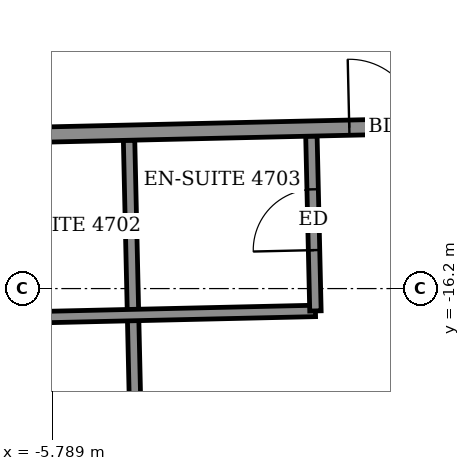
"""IFC4 building model, lengths in metres.
Left out: names, types, materials, properties, quantities, classifications, styles, units other than length and angle.
Written with IfcOpenShell. Run it as: python <this file> out.ifc"""

import sys

from ifc_helpers import new_model, si_unit, direction, frame, frame_2d, origin, place, context, subcontext, project, spatial, rectangle, extrude, element, fill, save


model = new_model("IFC4")
c1 = context("Model", 3, precision=1e-05, world=origin(), true_north=direction((0.0, 1.0)))
c2 = subcontext(c1, "Body", "Model", "MODEL_VIEW")
j1 = project(units=[si_unit("LENGTHUNIT", "METRE"), si_unit("PLANEANGLEUNIT", "RADIAN")], contexts=[c1])
p1 = place(None, origin())
s1 = spatial("IfcSite", under=j1, at=p1, CompositionType="ELEMENT")
p2 = place(p1, origin())
s2 = spatial("IfcBuilding", under=s1, at=p2, CompositionType="ELEMENT")
p3 = place(p2, frame((0.0, 0.0, 186.1)))
s3 = spatial("IfcBuildingStorey", under=s2, at=p3, CompositionType="ELEMENT", Elevation=186.1)
p4 = place(p3, frame((-4.646, -20.197, 0.0), z_axis=(0.0, 0.0, 1.0), x_axis=(-0.022692509051, 0.999742491861, 0.0)))
e1 = element("IfcWall", 1, at=p4, inside=s3, PredefinedType="PARTITIONING", context=c2, shape_type="SweptSolid", body=[
    extrude(rectangle(XDim=5.949, YDim=0.15, at=frame_2d((2.975, 0.0))), origin(), (0.0, 0.0, 1.0), 3.05),
])
p5 = place(p3, frame((-7.128, -16.603, 0.0), z_axis=(0.0, 0.0, 1.0), x_axis=(0.999741520352, 0.022735269617, 0.0)))
e2 = element("IfcWall", 2, at=p5, inside=s3, PredefinedType="PARTITIONING", context=c2, shape_type="SweptSolid", body=[
    extrude(rectangle(XDim=4.8, YDim=0.15, at=frame_2d((2.4, 0.0))), origin(), (0.0, 0.0, 1.0), 3.05),
])
p6 = place(p3, frame((-2.329, -16.494, 0.0), z_axis=(0.0, 0.0, 1.0), x_axis=(-0.023029983665, 0.999734774754, 0.0)))
e3 = element("IfcWall", 3, at=p6, inside=s3, PredefinedType="PARTITIONING", context=c2, shape_type="SweptSolid", body=[
    extrude(rectangle(XDim=2.3, YDim=0.15, at=frame_2d((1.15, 0.0))), origin(), (0.0, 0.0, 1.0), 3.05),
])
p7 = place(p6, frame((0.8, 0.0, 0.0)))
e4 = element("IfcOpeningElement", 4, at=p7, cuts=e3, PredefinedType="OPENING", context=c2, shape_type="SweptSolid", body=[
    extrude(rectangle(XDim=0.8, YDim=2.1, at=frame_2d((0.4, 1.05))), frame((0.0, 0.085, 0.0), z_axis=(0.0, -1.0, 0.0), x_axis=(1.0, 0.0, 0.0)), (0.0, 0.0, 1.0), 0.17),
])
p8 = place(p3, frame((-21.279, -14.523, 0.0), z_axis=(0.0, 0.0, 1.0), x_axis=(0.999742878501, 0.022675468818, 0.0)))
e5 = element("IfcWall", 5, at=p8, inside=s3, PredefinedType="PARTITIONING", context=c2, shape_type="SweptSolid", body=[
    extrude(rectangle(XDim=46.48, YDim=0.2, at=frame_2d((23.24, 0.0))), origin(), (0.0, 0.0, 1.0), 3.05),
])
p9 = place(p8, frame((1.4, 0.0, 0.0)))
e6 = element("IfcOpeningElement", 6, at=p9, cuts=e5, PredefinedType="OPENING", context=c2, shape_type="SweptSolid", body=[
    extrude(rectangle(XDim=1.0, YDim=2.1, at=frame_2d((0.5, 1.05))), frame((0.0, 0.11, 0.0), z_axis=(0.0, -1.0, 0.0), x_axis=(1.0, 0.0, 0.0)), (0.0, 0.0, 1.0), 0.22),
])
p10 = place(p8, frame((5.95, 0.0, 0.0)))
e7 = element("IfcOpeningElement", 7, at=p10, cuts=e5, PredefinedType="OPENING", context=c2, shape_type="SweptSolid", body=[
    extrude(rectangle(XDim=0.9, YDim=2.1, at=frame_2d((0.45, 1.05))), frame((0.0, 0.11, 0.0), z_axis=(0.0, -1.0, 0.0), x_axis=(1.0, 0.0, 0.0)), (0.0, 0.0, 1.0), 0.22),
])
p11 = place(p8, frame((10.575, 0.0, 0.0)))
e8 = element("IfcOpeningElement", 8, at=p11, cuts=e5, PredefinedType="OPENING", context=c2, shape_type="SweptSolid", body=[
    extrude(rectangle(XDim=0.9, YDim=2.1, at=frame_2d((0.45, 1.05))), frame((0.0, 0.11, 0.0), z_axis=(0.0, -1.0, 0.0), x_axis=(1.0, 0.0, 0.0)), (0.0, 0.0, 1.0), 0.22),
])
p12 = place(p8, frame((12.625, 0.0, 0.0)))
e9 = element("IfcOpeningElement", 9, at=p12, cuts=e5, PredefinedType="OPENING", context=c2, shape_type="SweptSolid", body=[
    extrude(rectangle(XDim=0.9, YDim=2.1, at=frame_2d((0.45, 1.05))), frame((0.0, 0.11, 0.0), z_axis=(0.0, -1.0, 0.0), x_axis=(1.0, 0.0, 0.0)), (0.0, 0.0, 1.0), 0.22),
])
p13 = place(p8, frame((19.4, 0.0, 0.0)))
e10 = element("IfcOpeningElement", 10, at=p13, cuts=e5, PredefinedType="OPENING", context=c2, shape_type="SweptSolid", body=[
    extrude(rectangle(XDim=0.9, YDim=2.1, at=frame_2d((0.45, 1.05))), frame((0.0, 0.11, 0.0), z_axis=(0.0, -1.0, 0.0), x_axis=(1.0, 0.0, 0.0)), (0.0, 0.0, 1.0), 0.22),
])
p14 = place(p8, frame((21.375, 0.0, 0.0)))
e11 = element("IfcOpeningElement", 11, at=p14, cuts=e5, PredefinedType="OPENING", context=c2, shape_type="SweptSolid", body=[
    extrude(rectangle(XDim=0.9, YDim=2.1, at=frame_2d((0.45, 1.05))), frame((0.0, 0.11, 0.0), z_axis=(0.0, -1.0, 0.0), x_axis=(1.0, 0.0, 0.0)), (0.0, 0.0, 1.0), 0.22),
])
p15 = place(p8, frame((28.15, 0.0, 0.0)))
e12 = element("IfcOpeningElement", 12, at=p15, cuts=e5, PredefinedType="OPENING", context=c2, shape_type="SweptSolid", body=[
    extrude(rectangle(XDim=0.9, YDim=2.1, at=frame_2d((0.45, 1.05))), frame((0.0, 0.11, 0.0), z_axis=(0.0, -1.0, 0.0), x_axis=(1.0, 0.0, 0.0)), (0.0, 0.0, 1.0), 0.22),
])
p16 = place(p8, frame((30.1, 0.0, 0.0)))
e13 = element("IfcOpeningElement", 13, at=p16, cuts=e5, PredefinedType="OPENING", context=c2, shape_type="SweptSolid", body=[
    extrude(rectangle(XDim=0.9, YDim=2.1, at=frame_2d((0.45, 1.05))), frame((0.0, 0.11, 0.0), z_axis=(0.0, -1.0, 0.0), x_axis=(1.0, 0.0, 0.0)), (0.0, 0.0, 1.0), 0.22),
])
p17 = place(p8, frame((36.875, 0.0, 0.0)))
e14 = element("IfcOpeningElement", 14, at=p17, cuts=e5, PredefinedType="OPENING", context=c2, shape_type="SweptSolid", body=[
    extrude(rectangle(XDim=0.9, YDim=2.1, at=frame_2d((0.45, 1.05))), frame((0.0, 0.11, 0.0), z_axis=(0.0, -1.0, 0.0), x_axis=(1.0, 0.0, 0.0)), (0.0, 0.0, 1.0), 0.22),
])
p18 = place(p8, frame((43.89, 0.0, 0.0)))
e15 = element("IfcOpeningElement", 15, at=p18, cuts=e5, PredefinedType="OPENING", context=c2, shape_type="SweptSolid", body=[
    extrude(rectangle(XDim=1.0, YDim=2.1, at=frame_2d((0.5, 1.05))), frame((0.0, 0.11, 0.0), z_axis=(0.0, -1.0, 0.0), x_axis=(1.0, 0.0, 0.0)), (0.0, 0.0, 1.0), 0.22),
])
p19 = place(p8, frame((39.05, 0.0, 0.0)))
e16 = element("IfcOpeningElement", 16, at=p19, cuts=e5, PredefinedType="OPENING", context=c2, shape_type="SweptSolid", body=[
    extrude(rectangle(XDim=0.9, YDim=2.1, at=frame_2d((0.45, 1.05))), frame((0.0, 0.11, 0.0), z_axis=(0.0, -1.0, 0.0), x_axis=(1.0, 0.0, 0.0)), (0.0, 0.0, 1.0), 0.22),
])
p20 = place(p13, origin())
e17 = element("IfcDoor", 17, at=p20, inside=s3, OperationType="SINGLE_SWING_LEFT", PredefinedType="DOOR", context=c2, shape_type="SweptSolid", body=[
    extrude(rectangle(XDim=0.9, YDim=2.1, at=frame_2d((0.45, 1.05))), frame((0.0, 0.025, 0.0), z_axis=(0.0, -1.0, 0.0), x_axis=(1.0, 0.0, 0.0)), (0.0, 0.0, 1.0), 0.05),
])
fill(e10, e17)
p21 = place(p7, origin())
e18 = element("IfcDoor", 18, at=p21, inside=s3, OperationType="SINGLE_SWING_LEFT", PredefinedType="DOOR", context=c2, shape_type="SweptSolid", body=[
    extrude(rectangle(XDim=0.8, YDim=2.1, at=frame_2d((0.4, 1.05))), frame((0.0, 0.025, 0.0), z_axis=(0.0, -1.0, 0.0), x_axis=(1.0, 0.0, 0.0)), (0.0, 0.0, 1.0), 0.05),
])
fill(e4, e18)
save(model, sys.argv[1])
